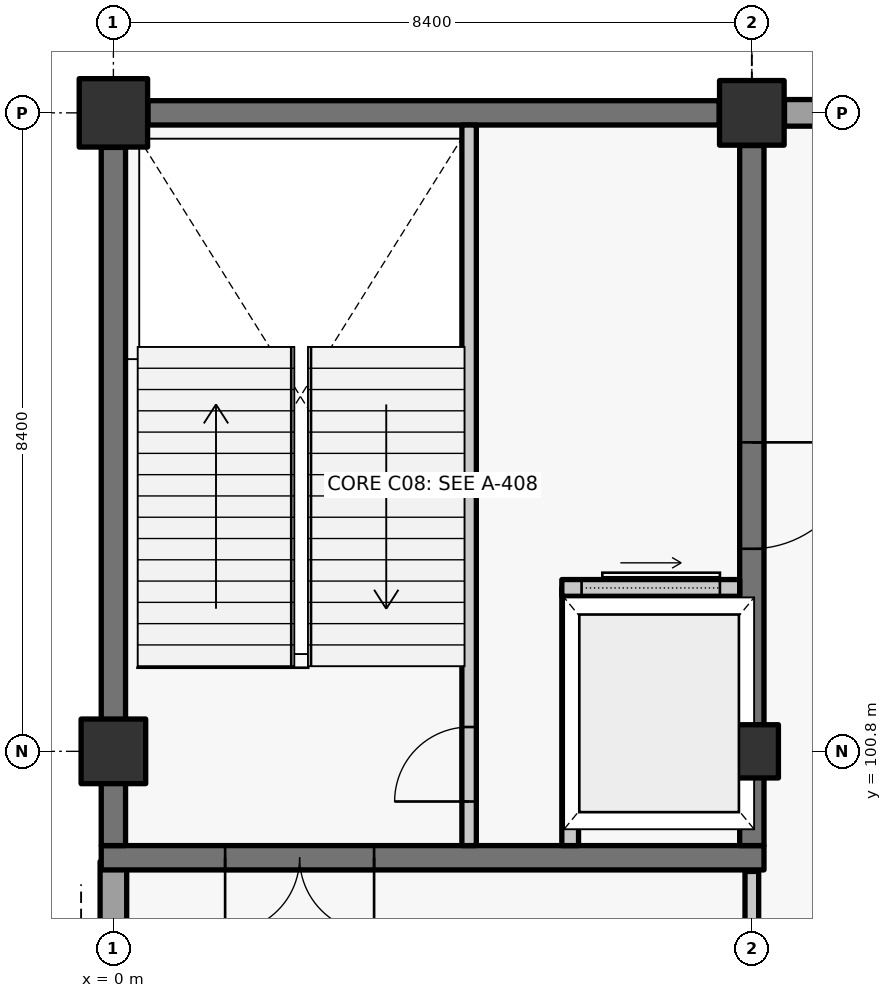
"""IFC4 building model, lengths in metres.
Left out: names, types, materials, properties, quantities, classifications, styles, units other than length and angle.
Written with IfcOpenShell. Run it as: python <this file> out.ifc"""

import sys

from ifc_helpers import new_model, si_unit, direction, frame, frame_2d, origin, origin_2d, place, context, subcontext, project, spatial, rectangle, extrude, element, fill, save


model = new_model("IFC4")
c1 = context("Model", 3, precision=1e-05, world=origin(), true_north=direction((0.0, 1.0)))
c2 = subcontext(c1, "Body", "Model", "MODEL_VIEW")
j1 = project(units=[si_unit("LENGTHUNIT", "METRE"), si_unit("PLANEANGLEUNIT", "RADIAN")], contexts=[c1])
p1 = place(None, origin())
s1 = spatial("IfcSite", under=j1, at=p1, CompositionType="ELEMENT")
p2 = place(p1, origin())
s2 = spatial("IfcBuilding", under=s1, at=p2, CompositionType="ELEMENT")
p3 = place(p2, frame((0.0, 0.0, 6.0)))
s3 = spatial("IfcBuildingStorey", under=s2, at=p3, CompositionType="ELEMENT", Elevation=6.0)
p4 = place(p3, frame((0.0, 100.8, 0.0), z_axis=(0.0, 0.0, 1.0), x_axis=(1.0, 0.0, 0.0)))
e1 = element("IfcColumn", 1, at=p4, inside=s3, PredefinedType="COLUMN", context=c2, shape_type="SweptSolid", body=[
    extrude(rectangle(XDim=0.85, YDim=0.85, at=origin_2d()), origin(), (0.0, 0.0, 1.0), 5.4),
])
p5 = place(p3, frame((0.0, 109.2, 0.0), z_axis=(0.0, 0.0, 1.0), x_axis=(1.0, 0.0, 0.0)))
e2 = element("IfcColumn", 2, at=p5, inside=s3, PredefinedType="COLUMN", context=c2, shape_type="SweptSolid", body=[
    extrude(rectangle(XDim=0.9, YDim=0.9, at=origin_2d()), origin(), (0.0, 0.0, 1.0), 5.4),
])
p6 = place(p3, frame((8.4, 100.8, 0.0), z_axis=(0.0, 0.0, 1.0), x_axis=(1.0, 0.0, 0.0)))
e3 = element("IfcColumn", 3, at=p6, inside=s3, PredefinedType="COLUMN", context=c2, shape_type="SweptSolid", body=[
    extrude(rectangle(XDim=0.7, YDim=0.7, at=origin_2d()), origin(), (0.0, 0.0, 1.0), 5.4),
])
p7 = place(p3, frame((8.4, 109.2, 0.0), z_axis=(0.0, 0.0, 1.0), x_axis=(1.0, 0.0, 0.0)))
e4 = element("IfcColumn", 4, at=p7, inside=s3, PredefinedType="COLUMN", context=c2, shape_type="SweptSolid", body=[
    extrude(rectangle(XDim=0.85, YDim=0.85, at=origin_2d()), origin(), (0.0, 0.0, 1.0), 5.4),
])
p8 = place(p3, frame((0.0, 92.83, 0.0), z_axis=(0.0, 0.0, 1.0), x_axis=(0.0, 1.0, 0.0)))
e5 = element("IfcWall", 5, at=p8, inside=s3, PredefinedType="SOLIDWALL", context=c2, shape_type="SweptSolid", body=[
    extrude(rectangle(XDim=6.52, YDim=0.35, at=frame_2d((3.26, 0.0))), origin(), (0.0, 0.0, 1.0), 4.73),
])
p9 = place(p8, frame((1.685, 0.0, 1.35)))
e6 = element("IfcOpeningElement", 6, at=p9, cuts=e5, PredefinedType="OPENING", context=c2, shape_type="SweptSolid", body=[
    extrude(rectangle(XDim=3.2, YDim=1.3, at=frame_2d((1.6, 0.65))), frame((0.0, 0.185, 0.0), z_axis=(0.0, -1.0, 0.0), x_axis=(1.0, 0.0, 0.0)), (0.0, 0.0, 1.0), 0.37),
])
p10 = place(p3, frame((8.83, 109.2, 0.0), z_axis=(0.0, 0.0, 1.0), x_axis=(1.0, 0.0, 0.0)))
e7 = element("IfcWall", 7, at=p10, inside=s3, PredefinedType="SOLIDWALL", context=c2, shape_type="SweptSolid", body=[
    extrude(rectangle(XDim=7.54, YDim=0.35, at=frame_2d((3.77, 0.0))), origin(), (0.0, 0.0, 1.0), 4.64),
])
p11 = place(p10, frame((1.97, 0.0, 1.4)))
e8 = element("IfcOpeningElement", 8, at=p11, cuts=e7, PredefinedType="OPENING", context=c2, shape_type="SweptSolid", body=[
    extrude(rectangle(XDim=3.6, YDim=1.35, at=frame_2d((1.8, 0.675))), frame((0.0, 0.185, 0.0), z_axis=(0.0, -1.0, 0.0), x_axis=(1.0, 0.0, 0.0)), (0.0, 0.0, 1.0), 0.37),
])
p12 = place(p3, frame((8.56, 99.4, 0.0), z_axis=(0.0, 0.0, 1.0), x_axis=(-1.0, 0.0, 0.0)))
e9 = element("IfcWall", 9, at=p12, inside=s3, PredefinedType="SHEAR", context=c2, shape_type="SweptSolid", body=[
    extrude(rectangle(XDim=8.72, YDim=0.32, at=frame_2d((4.36, 0.0))), origin(), (0.0, 0.0, 1.0), 5.12),
])
p13 = place(p12, frame((5.13, 0.0, 0.0)))
e10 = element("IfcOpeningElement", 10, at=p13, cuts=e9, PredefinedType="OPENING", context=c2, shape_type="SweptSolid", body=[
    extrude(rectangle(XDim=1.96, YDim=2.2, at=frame_2d((0.98, 1.1))), frame((0.0, 0.17, 0.0), z_axis=(0.0, -1.0, 0.0), x_axis=(1.0, 0.0, 0.0)), (0.0, 0.0, 1.0), 0.34),
])
p14 = place(p3, frame((0.0, 99.56, 0.0), z_axis=(0.0, 0.0, 1.0), x_axis=(0.0, 1.0, 0.0)))
e11 = element("IfcWall", 11, at=p14, inside=s3, PredefinedType="SHEAR", context=c2, shape_type="SweptSolid", body=[
    extrude(rectangle(XDim=9.185, YDim=0.32, at=frame_2d((4.593, 0.0))), origin(), (0.0, 0.0, 1.0), 5.12),
])
p15 = place(p3, frame((0.455, 109.2, 0.0), z_axis=(0.0, 0.0, 1.0), x_axis=(1.0, 0.0, 0.0)))
e12 = element("IfcWall", 12, at=p15, inside=s3, PredefinedType="SHEAR", context=c2, shape_type="SweptSolid", body=[
    extrude(rectangle(XDim=7.515, YDim=0.32, at=frame_2d((3.757, 0.0))), origin(), (0.0, 0.0, 1.0), 5.12),
])
p16 = place(p3, frame((8.4, 108.77, 0.0), z_axis=(0.0, 0.0, 1.0), x_axis=(0.0, -1.0, 0.0)))
e13 = element("IfcWall", 13, at=p16, inside=s3, PredefinedType="SHEAR", context=c2, shape_type="SweptSolid", body=[
    extrude(rectangle(XDim=9.21, YDim=0.32, at=frame_2d((4.605, 0.0))), origin(), (0.0, 0.0, 1.0), 5.12),
])
p17 = place(p16, frame((3.905, 0.0, 0.0)))
e14 = element("IfcOpeningElement", 14, at=p17, cuts=e13, PredefinedType="OPENING", context=c2, shape_type="SweptSolid", body=[
    extrude(rectangle(XDim=1.4, YDim=2.2, at=frame_2d((0.7, 1.1))), frame((0.0, 0.17, 0.0), z_axis=(0.0, -1.0, 0.0), x_axis=(1.0, 0.0, 0.0)), (0.0, 0.0, 1.0), 0.34),
])
p18 = place(p3, frame((4.68, 99.56, 0.0), z_axis=(0.0, 0.0, 1.0), x_axis=(0.0, 1.0, 0.0)))
e15 = element("IfcWall", 15, at=p18, inside=s3, PredefinedType="SOLIDWALL", context=c2, shape_type="SweptSolid", body=[
    extrude(rectangle(XDim=9.48, YDim=0.19, at=frame_2d((4.74, 0.0))), origin(), (0.0, 0.0, 1.0), 5.12),
])
p19 = place(p18, frame((0.58, 0.0, 0.0)))
e16 = element("IfcOpeningElement", 16, at=p19, cuts=e15, PredefinedType="OPENING", context=c2, shape_type="SweptSolid", body=[
    extrude(rectangle(XDim=0.98, YDim=2.15, at=frame_2d((0.49, 1.075))), frame((0.0, 0.105, 0.0), z_axis=(0.0, -1.0, 0.0), x_axis=(1.0, 0.0, 0.0)), (0.0, 0.0, 1.0), 0.21),
])
p20 = place(p3, frame((6.01, 99.56, 0.0), z_axis=(0.0, 0.0, 1.0), x_axis=(0.0, 1.0, 0.0)))
e17 = element("IfcWall", 17, at=p20, inside=s3, PredefinedType="SOLIDWALL", context=c2, shape_type="SweptSolid", body=[
    extrude(rectangle(XDim=3.39, YDim=0.22, at=frame_2d((1.695, 0.0))), origin(), (0.0, 0.0, 1.0), 5.12),
])
p21 = place(p3, frame((5.9, 102.95, 0.0), z_axis=(0.0, 0.0, 1.0), x_axis=(1.0, 0.0, 0.0)))
e18 = element("IfcWall", 18, at=p21, inside=s3, PredefinedType="SOLIDWALL", context=c2, shape_type="SweptSolid", body=[
    extrude(rectangle(XDim=2.34, YDim=0.22, at=frame_2d((1.17, 0.0))), origin(), (0.0, 0.0, 1.0), 5.12),
])
p22 = place(p21, frame((0.26, 0.0, 0.0)))
e19 = element("IfcOpeningElement", 19, at=p22, cuts=e18, PredefinedType="OPENING", context=c2, shape_type="SweptSolid", body=[
    extrude(rectangle(XDim=1.82, YDim=2.4, at=frame_2d((0.91, 1.2))), frame((0.0, 0.12, 0.0), z_axis=(0.0, -1.0, 0.0), x_axis=(1.0, 0.0, 0.0)), (0.0, 0.0, 1.0), 0.24),
])
p23 = place(p3, frame((8.4, 92.85, 0.0), z_axis=(0.0, 0.0, 1.0), x_axis=(0.0, 1.0, 0.0)))
e20 = element("IfcWall", 20, at=p23, inside=s3, PredefinedType="PARTITIONING", context=c2, shape_type="SweptSolid", body=[
    extrude(rectangle(XDim=6.37, YDim=0.18, at=frame_2d((3.185, 0.0))), origin(), (0.0, 0.0, 1.0), 4.73),
])
p24 = place(p19, origin())
e21 = element("IfcDoor", 21, at=p24, inside=s3, OperationType="SINGLE_SWING_LEFT", PredefinedType="DOOR", context=c2, shape_type="SweptSolid", body=[
    extrude(rectangle(XDim=0.98, YDim=2.15, at=frame_2d((0.49, 1.075))), frame((0.0, 0.025, 0.0), z_axis=(0.0, -1.0, 0.0), x_axis=(1.0, 0.0, 0.0)), (0.0, 0.0, 1.0), 0.05),
])
fill(e16, e21)
p25 = place(p13, origin())
e22 = element("IfcDoor", 22, at=p25, inside=s3, OperationType="DOUBLE_DOOR_SINGLE_SWING", PredefinedType="DOOR", context=c2, shape_type="SweptSolid", body=[
    extrude(rectangle(XDim=1.96, YDim=2.2, at=frame_2d((0.98, 1.1))), frame((0.0, 0.025, 0.0), z_axis=(0.0, -1.0, 0.0), x_axis=(1.0, 0.0, 0.0)), (0.0, 0.0, 1.0), 0.05),
])
fill(e10, e22)
p26 = place(p17, origin())
e23 = element("IfcDoor", 23, at=p26, inside=s3, OperationType="SINGLE_SWING_LEFT", PredefinedType="DOOR", context=c2, shape_type="SweptSolid", body=[
    extrude(rectangle(XDim=1.4, YDim=2.2, at=frame_2d((0.7, 1.1))), frame((0.0, 0.025, 0.0), z_axis=(0.0, -1.0, 0.0), x_axis=(1.0, 0.0, 0.0)), (0.0, 0.0, 1.0), 0.05),
])
fill(e14, e23)
p27 = place(p22, origin())
e24 = element("IfcDoor", 24, at=p27, inside=s3, OperationType="SLIDING_TO_RIGHT", PredefinedType="DOOR", context=c2, shape_type="SweptSolid", body=[
    extrude(rectangle(XDim=1.82, YDim=2.4, at=frame_2d((0.91, 1.2))), frame((0.0, 0.025, 0.0), z_axis=(0.0, -1.0, 0.0), x_axis=(1.0, 0.0, 0.0)), (0.0, 0.0, 1.0), 0.05),
])
fill(e19, e24)
save(model, sys.argv[1])
